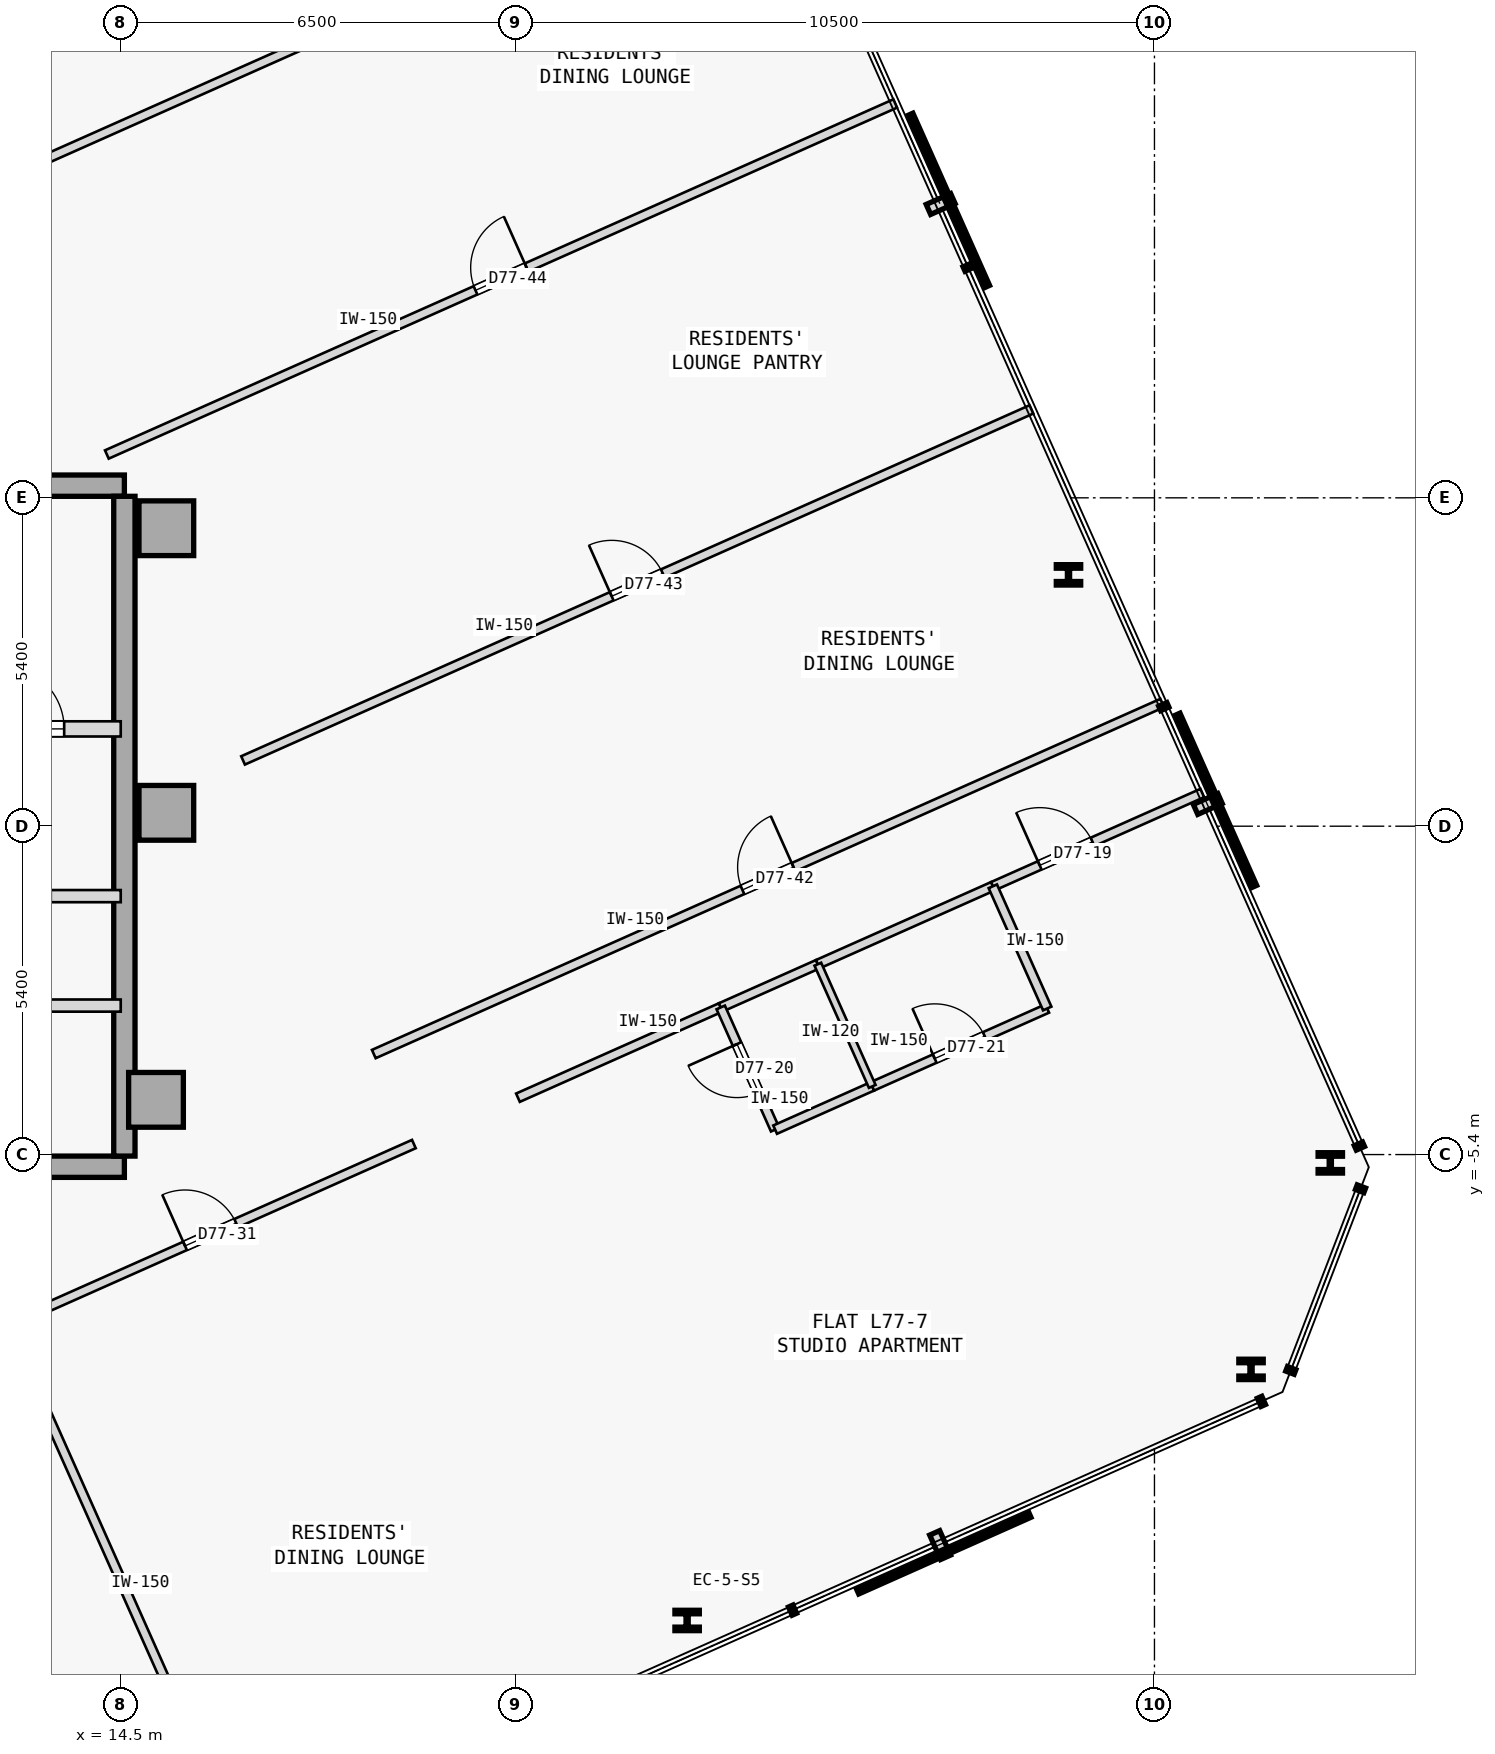
"""IFC4 building model, lengths in metres.
Left out: names, types, materials, properties, quantities, classifications, styles, units other than length and angle.
Written with IfcOpenShell. Run it as: python <this file> out.ifc"""

import sys

from ifc_helpers import new_model, si_unit, direction, frame, frame_2d, origin, origin_2d, place, context, subcontext, project, spatial, rectangle, i_section, extrude, element, fill, save


model = new_model("IFC4")
c1 = context("Model", 3, precision=1e-05, world=origin(), true_north=direction((0.0, 1.0)))
c2 = subcontext(c1, "Body", "Model", "MODEL_VIEW")
j1 = project(units=[si_unit("LENGTHUNIT", "METRE"), si_unit("PLANEANGLEUNIT", "RADIAN")], contexts=[c1])
p1 = place(None, origin())
s1 = spatial("IfcSite", under=j1, at=p1, CompositionType="ELEMENT")
p2 = place(p1, origin())
s2 = spatial("IfcBuilding", under=s1, at=p2, CompositionType="ELEMENT")
p3 = place(p2, frame((0.0, 0.0, 288.6)))
s3 = spatial("IfcBuildingStorey", under=s2, at=p3, CompositionType="ELEMENT", Elevation=288.6)
for number, where, z_axis, x_axis in (
    (1, (15.25, 4.9, 0.0), (0.0, 0.0, 1.0), (1.0, 0.0, 0.0)),
    (2, (15.25, 0.22, 0.0), (0.0, 0.0, 1.0), (1.0, 0.0, 0.0)),
    (3, (15.08, -4.5, 0.0), (0.0, 0.0, 1.0), (1.0, 0.0, 0.0)),
):
    element("IfcColumn", number, at=place(p3, frame(where, z_axis=z_axis, x_axis=x_axis)), inside=s3, PredefinedType="COLUMN", context=c2, shape_type="SweptSolid", body=[
        extrude(rectangle(XDim=0.9, YDim=0.9, at=origin_2d()), origin(), (0.0, 0.0, 1.0), 3.35),
    ])
p4 = place(p3, frame((3.15, 5.6, 0.0), z_axis=(0.0, 0.0, 1.0), x_axis=(1.0, 0.0, 0.0)))
e4 = element("IfcWall", 4, at=p4, inside=s3, PredefinedType="SHEAR", context=c2, shape_type="SweptSolid", body=[
    extrude(rectangle(XDim=11.41, YDim=0.35, at=frame_2d((5.705, 0.0))), origin(), (0.0, 0.0, 1.0), 3.125),
])
p5 = place(p3, frame((3.7, -5.6, 0.0), z_axis=(0.0, 0.0, 1.0), x_axis=(1.0, 0.0, 0.0)))
e5 = element("IfcWall", 5, at=p5, inside=s3, PredefinedType="SHEAR", context=c2, shape_type="SweptSolid", body=[
    extrude(rectangle(XDim=10.86, YDim=0.35, at=frame_2d((5.43, 0.0))), origin(), (0.0, 0.0, 1.0), 3.125),
])
p6 = place(p3, frame((14.56, -5.425, 0.0), z_axis=(0.0, 0.0, 1.0), x_axis=(0.0, 1.0, 0.0)))
e6 = element("IfcWall", 6, at=p6, inside=s3, PredefinedType="SHEAR", context=c2, shape_type="SweptSolid", body=[
    extrude(rectangle(XDim=10.85, YDim=0.35, at=frame_2d((5.425, 0.0))), origin(), (0.0, 0.0, 1.0), 3.125),
])
for number, where, z_axis, x_axis in (
    (7, (23.814, -13.062, 0.0), (0.0, 0.0, 1.0), (1.0, 0.0, 0.0)),
    (8, (33.088, -8.933, 0.0), (0.0, 0.0, 1.0), (1.0, 0.0, 0.0)),
    (9, (34.392, -5.537, 0.0), (0.0, 0.0, 1.0), (1.0, 0.0, 0.0)),
    (10, (30.086, 4.133, 0.0), (0.0, 0.0, 1.0), (1.0, 0.0, 0.0)),
):
    element("IfcColumn", number, at=place(p3, frame(where, z_axis=z_axis, x_axis=x_axis)), inside=s3, PredefinedType="COLUMN", context=c2, shape_type="SweptSolid", body=[
        extrude(i_section(OverallWidth=0.401, OverallDepth=0.335, WebThickness=0.036, FlangeThickness=0.058, FilletRadius=0.015, at=origin_2d()), origin(), (0.0, 0.0, 1.0), 3.35),
    ])
p7 = place(p3, frame((10.9, 1.6, 0.0), z_axis=(0.0, 0.0, 1.0), x_axis=(1.0, 0.0, 0.0)))
e11 = element("IfcWall", 11, at=p7, inside=s3, PredefinedType="STANDARD", context=c2, shape_type="SweptSolid", body=[
    extrude(rectangle(XDim=3.6, YDim=0.25, at=frame_2d((1.8, 0.0))), origin(), (0.0, 0.0, 1.0), 3.125),
])
p8 = place(p7, frame((1.62, 0.0, 0.0)))
e12 = element("IfcOpeningElement", 12, at=p8, cuts=e11, PredefinedType="OPENING", context=c2, shape_type="SweptSolid", body=[
    extrude(rectangle(XDim=1.05, YDim=2.15, at=frame_2d((0.525, 1.075))), frame((0.0, 0.135, 0.0), z_axis=(0.0, -1.0, 0.0), x_axis=(1.0, 0.0, 0.0)), (0.0, 0.0, 1.0), 0.27),
])
p9 = place(p3, frame((11.55, -1.15, 0.0), z_axis=(0.0, 0.0, 1.0), x_axis=(1.0, 0.0, 0.0)))
e13 = element("IfcWall", 13, at=p9, inside=s3, PredefinedType="STANDARD", context=c2, shape_type="SweptSolid", body=[
    extrude(rectangle(XDim=2.95, YDim=0.2, at=frame_2d((1.475, 0.0))), origin(), (0.0, 0.0, 1.0), 3.125),
])
p10 = place(p9, frame((0.75, 0.0, 0.0)))
e14 = element("IfcOpeningElement", 14, at=p10, cuts=e13, PredefinedType="OPENING", context=c2, shape_type="SweptSolid", body=[
    extrude(rectangle(XDim=1.05, YDim=2.18, at=frame_2d((0.525, 1.09))), frame((0.0, 0.11, 0.0), z_axis=(0.0, -1.0, 0.0), x_axis=(1.0, 0.0, 0.0)), (0.0, 0.0, 1.0), 0.22),
])
p11 = place(p3, frame((3.7, -2.95, 0.0), z_axis=(0.0, 0.0, 1.0), x_axis=(1.0, 0.0, 0.0)))
e15 = element("IfcWall", 15, at=p11, inside=s3, PredefinedType="STANDARD", context=c2, shape_type="SweptSolid", body=[
    extrude(rectangle(XDim=10.8, YDim=0.2, at=frame_2d((5.4, 0.0))), origin(), (0.0, 0.0, 1.0), 3.125),
])
p12 = place(p11, frame((0.53, 0.0, 0.0)))
e16 = element("IfcOpeningElement", 16, at=p12, cuts=e15, PredefinedType="OPENING", context=c2, shape_type="SweptSolid", body=[
    extrude(rectangle(XDim=1.1, YDim=2.15, at=frame_2d((0.55, 1.075))), frame((0.0, 0.11, 0.0), z_axis=(0.0, -1.0, 0.0), x_axis=(1.0, 0.0, 0.0)), (0.0, 0.0, 1.0), 0.22),
])
p13 = place(p11, frame((4.14, 0.0, 0.0)))
e17 = element("IfcOpeningElement", 17, at=p13, cuts=e15, PredefinedType="OPENING", context=c2, shape_type="SweptSolid", body=[
    extrude(rectangle(XDim=0.92, YDim=2.15, at=frame_2d((0.46, 1.075))), frame((0.0, 0.11, 0.0), z_axis=(0.0, -1.0, 0.0), x_axis=(1.0, 0.0, 0.0)), (0.0, 0.0, 1.0), 0.22),
])
p14 = place(p11, frame((8.46, 0.0, 0.0)))
e18 = element("IfcOpeningElement", 18, at=p14, cuts=e15, PredefinedType="OPENING", context=c2, shape_type="SweptSolid", body=[
    extrude(rectangle(XDim=0.92, YDim=2.15, at=frame_2d((0.46, 1.075))), frame((0.0, 0.11, 0.0), z_axis=(0.0, -1.0, 0.0), x_axis=(1.0, 0.0, 0.0)), (0.0, 0.0, 1.0), 0.22),
])
p15 = place(p3, frame((21.033, -4.465, 0.0), z_axis=(0.0, 0.0, 1.0), x_axis=(0.913543802, 0.40674036169, 0.0)))
e19 = element("IfcWall", 19, at=p15, inside=s3, PredefinedType="PARTITIONING", context=c2, shape_type="SweptSolid", body=[
    extrude(rectangle(XDim=3.65, YDim=0.15, at=frame_2d((1.825, 0.0))), origin(), (0.0, 0.0, 1.0), 3.125),
])
p16 = place(p3, frame((28.842, -0.988, 0.0), z_axis=(0.0, 0.0, 1.0), x_axis=(0.913541633228, 0.406745232743, 0.0)))
e20 = element("IfcWall", 20, at=p16, inside=s3, PredefinedType="PARTITIONING", context=c2, shape_type="SweptSolid", body=[
    extrude(rectangle(XDim=3.77, YDim=0.15, at=frame_2d((1.885, 0.0))), origin(), (0.0, 0.0, 1.0), 3.125),
])
p17 = place(p16, frame((0.844, 0.0, 0.0)))
e21 = element("IfcOpeningElement", 21, at=p17, cuts=e20, PredefinedType="OPENING", context=c2, shape_type="SweptSolid", body=[
    extrude(rectangle(XDim=0.95, YDim=2.15, at=frame_2d((0.475, 1.075))), frame((0.0, 0.085, 0.0), z_axis=(0.0, -1.0, 0.0), x_axis=(1.0, 0.0, 0.0)), (0.0, 0.0, 1.0), 0.17),
])
p18 = place(p3, frame((24.367, -2.98, 0.0), z_axis=(0.0, 0.0, 1.0), x_axis=(0.9135579554, 0.406708571492, 0.0)))
e22 = element("IfcWall", 22, at=p18, inside=s3, PredefinedType="PARTITIONING", context=c2, shape_type="SweptSolid", body=[
    extrude(rectangle(XDim=1.748, YDim=0.15, at=frame_2d((0.874, 0.0))), origin(), (0.0, 0.0, 1.0), 3.125),
])
p19 = place(p3, frame((25.964, -2.269, 0.0), z_axis=(0.0, 0.0, 1.0), x_axis=(0.913542880558, 0.406742431252, 0.0)))
e23 = element("IfcWall", 23, at=p19, inside=s3, PredefinedType="PARTITIONING", context=c2, shape_type="SweptSolid", body=[
    extrude(rectangle(XDim=3.15, YDim=0.15, at=frame_2d((1.575, 0.0))), origin(), (0.0, 0.0, 1.0), 3.125),
])
p20 = place(p3, frame((12.635, -8.204, 0.0), z_axis=(0.0, 0.0, 1.0), x_axis=(0.913541702649, 0.406745076825, 0.0)))
e24 = element("IfcWall", 24, at=p20, inside=s3, PredefinedType="PARTITIONING", context=c2, shape_type="SweptSolid", body=[
    extrude(rectangle(XDim=7.318, YDim=0.15, at=frame_2d((3.659, 0.0))), origin(), (0.0, 0.0, 1.0), 3.125),
])
p21 = place(p20, frame((3.199, 0.0, 0.0)))
e25 = element("IfcOpeningElement", 25, at=p21, cuts=e24, PredefinedType="OPENING", context=c2, shape_type="SweptSolid", body=[
    extrude(rectangle(XDim=0.92, YDim=2.15, at=frame_2d((0.46, 1.075))), frame((0.0, 0.085, 0.0), z_axis=(0.0, -1.0, 0.0), x_axis=(1.0, 0.0, 0.0)), (0.0, 0.0, 1.0), 0.17),
])
p22 = place(p3, frame((18.662, -3.747, 0.0), z_axis=(0.0, 0.0, 1.0), x_axis=(0.913544622417, 0.406738519018, 0.0)))
e26 = element("IfcWall", 26, at=p22, inside=s3, PredefinedType="PARTITIONING", context=c2, shape_type="SweptSolid", body=[
    extrude(rectangle(XDim=14.192, YDim=0.15, at=frame_2d((7.096, 0.0))), origin(), (0.0, 0.0, 1.0), 3.125),
])
p23 = place(p22, frame((6.636, 0.0, 0.0)))
e27 = element("IfcOpeningElement", 27, at=p23, cuts=e26, PredefinedType="OPENING", context=c2, shape_type="SweptSolid", body=[
    extrude(rectangle(XDim=0.92, YDim=2.15, at=frame_2d((0.46, 1.075))), frame((0.0, 0.085, 0.0), z_axis=(0.0, -1.0, 0.0), x_axis=(1.0, 0.0, 0.0)), (0.0, 0.0, 1.0), 0.17),
])
p24 = place(p3, frame((25.262, -4.99, 0.0), z_axis=(0.0, 0.0, 1.0), x_axis=(-0.406725294076, 0.913550510459, 0.0)))
e28 = element("IfcWall", 28, at=p24, inside=s3, PredefinedType="PARTITIONING", context=c2, shape_type="SweptSolid", body=[
    extrude(rectangle(XDim=2.2, YDim=0.15, at=frame_2d((1.1, 0.0))), origin(), (0.0, 0.0, 1.0), 3.125),
])
p25 = place(p24, frame((0.66, 0.0, 0.0)))
e29 = element("IfcOpeningElement", 29, at=p25, cuts=e28, PredefinedType="OPENING", context=c2, shape_type="SweptSolid", body=[
    extrude(rectangle(XDim=0.88, YDim=2.15, at=frame_2d((0.44, 1.075))), frame((0.0, 0.085, 0.0), z_axis=(0.0, -1.0, 0.0), x_axis=(1.0, 0.0, 0.0)), (0.0, 0.0, 1.0), 0.17),
])
p26 = place(p3, frame((25.262, -4.99, 0.0), z_axis=(0.0, 0.0, 1.0), x_axis=(0.9135579554, 0.406708571492, 0.0)))
e30 = element("IfcWall", 30, at=p26, inside=s3, PredefinedType="PARTITIONING", context=c2, shape_type="SweptSolid", body=[
    extrude(rectangle(XDim=1.748, YDim=0.15, at=frame_2d((0.874, 0.0))), origin(), (0.0, 0.0, 1.0), 3.125),
])
p27 = place(p3, frame((26.859, -4.279, 0.0), z_axis=(0.0, 0.0, 1.0), x_axis=(0.913542880558, 0.406742431252, 0.0)))
e31 = element("IfcWall", 31, at=p27, inside=s3, PredefinedType="PARTITIONING", context=c2, shape_type="SweptSolid", body=[
    extrude(rectangle(XDim=3.15, YDim=0.15, at=frame_2d((1.575, 0.0))), origin(), (0.0, 0.0, 1.0), 3.125),
])
p28 = place(p27, frame((1.125, 0.0, 0.0)))
e32 = element("IfcOpeningElement", 32, at=p28, cuts=e31, PredefinedType="OPENING", context=c2, shape_type="SweptSolid", body=[
    extrude(rectangle(XDim=0.9, YDim=2.15, at=frame_2d((0.45, 1.075))), frame((0.0, 0.085, 0.0), z_axis=(0.0, -1.0, 0.0), x_axis=(1.0, 0.0, 0.0)), (0.0, 0.0, 1.0), 0.17),
])
p29 = place(p3, frame((29.737, -2.998, 0.0), z_axis=(0.0, 0.0, 1.0), x_axis=(-0.406725294076, 0.913550510459, 0.0)))
e33 = element("IfcWall", 33, at=p29, inside=s3, PredefinedType="PARTITIONING", context=c2, shape_type="SweptSolid", body=[
    extrude(rectangle(XDim=2.2, YDim=0.15, at=frame_2d((1.1, 0.0))), origin(), (0.0, 0.0, 1.0), 3.125),
])
p30 = place(p3, frame((26.859, -4.279, 0.0), z_axis=(0.0, 0.0, 1.0), x_axis=(-0.406725294076, 0.913550510459, 0.0)))
e34 = element("IfcWall", 34, at=p30, inside=s3, PredefinedType="PARTITIONING", context=c2, shape_type="SweptSolid", body=[
    extrude(rectangle(XDim=2.2, YDim=0.12, at=frame_2d((1.1, 0.0))), origin(), (0.0, 0.0, 1.0), 3.125),
])
p31 = place(p3, frame((16.514, -16.914, 0.0), z_axis=(0.0, 0.0, 1.0), x_axis=(-0.406729927653, 0.913548447512, 0.0)))
e35 = element("IfcWall", 35, at=p31, inside=s3, PredefinedType="PARTITIONING", context=c2, shape_type="SweptSolid", body=[
    extrude(rectangle(XDim=9.535, YDim=0.15, at=frame_2d((4.768, 0.0))), origin(), (0.0, 0.0, 1.0), 3.125),
])
p32 = place(p3, frame((16.512, 1.082, 0.0), z_axis=(0.0, 0.0, 1.0), x_axis=(0.913544622417, 0.406738519018, 0.0)))
e36 = element("IfcWall", 36, at=p32, inside=s3, PredefinedType="PARTITIONING", context=c2, shape_type="SweptSolid", body=[
    extrude(rectangle(XDim=14.192, YDim=0.15, at=frame_2d((7.096, 0.0))), origin(), (0.0, 0.0, 1.0), 3.125),
])
p33 = place(p32, frame((6.636, 0.0, 0.0)))
e37 = element("IfcOpeningElement", 37, at=p33, cuts=e36, PredefinedType="OPENING", context=c2, shape_type="SweptSolid", body=[
    extrude(rectangle(XDim=0.92, YDim=2.15, at=frame_2d((0.46, 1.075))), frame((0.0, 0.085, 0.0), z_axis=(0.0, -1.0, 0.0), x_axis=(1.0, 0.0, 0.0)), (0.0, 0.0, 1.0), 0.17),
])
p34 = place(p3, frame((14.272, 6.113, 0.0), z_axis=(0.0, 0.0, 1.0), x_axis=(0.913551014388, 0.406724162191, 0.0)))
e38 = element("IfcWall", 38, at=p34, inside=s3, PredefinedType="PARTITIONING", context=c2, shape_type="SweptSolid", body=[
    extrude(rectangle(XDim=14.192, YDim=0.15, at=frame_2d((7.096, 0.0))), origin(), (0.0, 0.0, 1.0), 3.125),
])
p35 = place(p34, frame((6.636, 0.0, 0.0)))
e39 = element("IfcOpeningElement", 39, at=p35, cuts=e38, PredefinedType="OPENING", context=c2, shape_type="SweptSolid", body=[
    extrude(rectangle(XDim=0.92, YDim=2.15, at=frame_2d((0.46, 1.075))), frame((0.0, 0.085, 0.0), z_axis=(0.0, -1.0, 0.0), x_axis=(1.0, 0.0, 0.0)), (0.0, 0.0, 1.0), 0.17),
])
p36 = place(p3, frame((12.301, 10.54, 0.0), z_axis=(0.0, 0.0, 1.0), x_axis=(0.913544622417, 0.406738519018, 0.0)))
e40 = element("IfcWall", 40, at=p36, inside=s3, PredefinedType="PARTITIONING", context=c2, shape_type="SweptSolid", body=[
    extrude(rectangle(XDim=14.192, YDim=0.15, at=frame_2d((7.096, 0.0))), origin(), (0.0, 0.0, 1.0), 2.675),
])
p37 = place(p36, frame((6.636, 0.0, 0.0)))
e41 = element("IfcOpeningElement", 41, at=p37, cuts=e40, PredefinedType="OPENING", context=c2, shape_type="SweptSolid", body=[
    extrude(rectangle(XDim=0.92, YDim=2.15, at=frame_2d((0.46, 1.075))), frame((0.0, 0.085, 0.0), z_axis=(0.0, -1.0, 0.0), x_axis=(1.0, 0.0, 0.0)), (0.0, 0.0, 1.0), 0.17),
])
p38 = place(p8, origin())
e42 = element("IfcDoor", 42, at=p38, inside=s3, OperationType="SINGLE_SWING_LEFT", PredefinedType="DOOR", context=c2, shape_type="SweptSolid", body=[
    extrude(rectangle(XDim=1.05, YDim=2.15, at=frame_2d((0.525, 1.075))), frame((0.0, 0.025, 0.0), z_axis=(0.0, -1.0, 0.0), x_axis=(1.0, 0.0, 0.0)), (0.0, 0.0, 1.0), 0.05),
])
fill(e12, e42)
p39 = place(p17, origin())
e43 = element("IfcDoor", 43, at=p39, inside=s3, OperationType="SINGLE_SWING_LEFT", PredefinedType="DOOR", context=c2, shape_type="SweptSolid", body=[
    extrude(rectangle(XDim=0.95, YDim=2.15, at=frame_2d((0.475, 1.075))), frame((0.0, 0.025, 0.0), z_axis=(0.0, -1.0, 0.0), x_axis=(1.0, 0.0, 0.0)), (0.0, 0.0, 1.0), 0.05),
])
fill(e21, e43)
p40 = place(p25, origin())
e44 = element("IfcDoor", 44, at=p40, inside=s3, OperationType="SINGLE_SWING_RIGHT", PredefinedType="DOOR", context=c2, shape_type="SweptSolid", body=[
    extrude(rectangle(XDim=0.88, YDim=2.15, at=frame_2d((0.44, 1.075))), frame((0.0, 0.025, 0.0), z_axis=(0.0, -1.0, 0.0), x_axis=(1.0, 0.0, 0.0)), (0.0, 0.0, 1.0), 0.05),
])
fill(e29, e44)
p41 = place(p28, origin())
e45 = element("IfcDoor", 45, at=p41, inside=s3, OperationType="SINGLE_SWING_LEFT", PredefinedType="DOOR", context=c2, shape_type="SweptSolid", body=[
    extrude(rectangle(XDim=0.9, YDim=2.15, at=frame_2d((0.45, 1.075))), frame((0.0, 0.025, 0.0), z_axis=(0.0, -1.0, 0.0), x_axis=(1.0, 0.0, 0.0)), (0.0, 0.0, 1.0), 0.05),
])
fill(e32, e45)
p42 = place(p21, origin())
e46 = element("IfcDoor", 46, at=p42, inside=s3, OperationType="SINGLE_SWING_LEFT", PredefinedType="DOOR", context=c2, shape_type="SweptSolid", body=[
    extrude(rectangle(XDim=0.92, YDim=2.15, at=frame_2d((0.46, 1.075))), frame((0.0, 0.025, 0.0), z_axis=(0.0, -1.0, 0.0), x_axis=(1.0, 0.0, 0.0)), (0.0, 0.0, 1.0), 0.05),
])
fill(e25, e46)
p43 = place(p23, origin())
e47 = element("IfcDoor", 47, at=p43, inside=s3, OperationType="SINGLE_SWING_RIGHT", PredefinedType="DOOR", context=c2, shape_type="SweptSolid", body=[
    extrude(rectangle(XDim=0.92, YDim=2.15, at=frame_2d((0.46, 1.075))), frame((0.0, 0.025, 0.0), z_axis=(0.0, -1.0, 0.0), x_axis=(1.0, 0.0, 0.0)), (0.0, 0.0, 1.0), 0.05),
])
fill(e27, e47)
p44 = place(p33, origin())
e48 = element("IfcDoor", 48, at=p44, inside=s3, OperationType="SINGLE_SWING_LEFT", PredefinedType="DOOR", context=c2, shape_type="SweptSolid", body=[
    extrude(rectangle(XDim=0.92, YDim=2.15, at=frame_2d((0.46, 1.075))), frame((0.0, 0.025, 0.0), z_axis=(0.0, -1.0, 0.0), x_axis=(1.0, 0.0, 0.0)), (0.0, 0.0, 1.0), 0.05),
])
fill(e37, e48)
p45 = place(p35, origin())
e49 = element("IfcDoor", 49, at=p45, inside=s3, OperationType="SINGLE_SWING_RIGHT", PredefinedType="DOOR", context=c2, shape_type="SweptSolid", body=[
    extrude(rectangle(XDim=0.92, YDim=2.15, at=frame_2d((0.46, 1.075))), frame((0.0, 0.025, 0.0), z_axis=(0.0, -1.0, 0.0), x_axis=(1.0, 0.0, 0.0)), (0.0, 0.0, 1.0), 0.05),
])
fill(e39, e49)
save(model, sys.argv[1])
